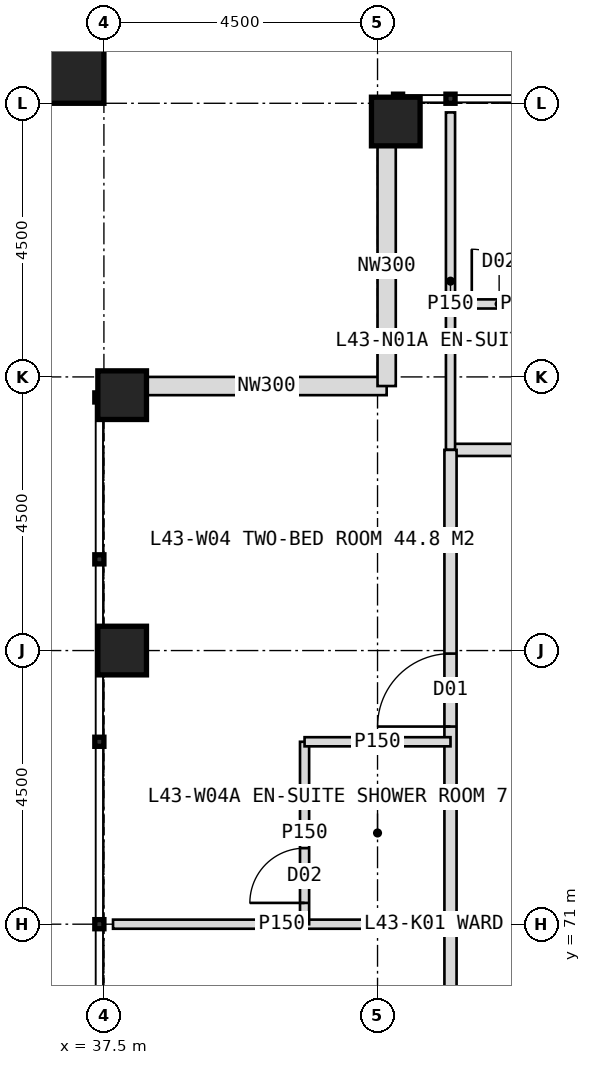
"""IFC4 building model, lengths in metres.
Left out: names, types, materials, properties, quantities, classifications, styles, units other than length and angle.
Written with IfcOpenShell. Run it as: python <this file> out.ifc"""

import sys

from ifc_helpers import new_model, si_unit, direction, frame, frame_2d, origin, origin_2d, place, context, subcontext, project, spatial, rectangle, hollow_rectangle, extrude, element, fill, save


model = new_model("IFC4")
c1 = context("Model", 3, precision=1e-05, world=origin(), true_north=direction((0.0, 1.0)))
c2 = subcontext(c1, "Body", "Model", "MODEL_VIEW")
j1 = project(units=[si_unit("LENGTHUNIT", "METRE"), si_unit("PLANEANGLEUNIT", "RADIAN")], contexts=[c1])
p1 = place(None, origin())
s1 = spatial("IfcSite", under=j1, at=p1, CompositionType="ELEMENT")
p2 = place(p1, origin())
s2 = spatial("IfcBuilding", under=s1, at=p2, CompositionType="ELEMENT")
p3 = place(p2, frame((0.0, 0.0, 181.0)))
s3 = spatial("IfcBuildingStorey", under=s2, at=p3, CompositionType="ELEMENT", Elevation=181.0)
for number, where, z_axis, x_axis in (
    (1, (42.3, 84.2, 0.0), (0.0, 0.0, 1.0), (1.0, 0.0, 0.0)),
    (2, (37.8, 75.5, 0.0), (0.0, 0.0, 1.0), (1.0, 0.0, 0.0)),
    (3, (37.8, 79.7, 0.0), (0.0, 0.0, 1.0), (1.0, 0.0, 0.0)),
):
    element("IfcColumn", number, at=place(p3, frame(where, z_axis=z_axis, x_axis=x_axis)), inside=s3, PredefinedType="COLUMN", context=c2, shape_type="SweptSolid", body=[
        extrude(hollow_rectangle(XDim=0.8, YDim=0.8, WallThickness=0.08, at=origin_2d()), origin(), (0.0, 0.0, 1.0), 4.0),
    ])
p4 = place(p3, frame((36.9, 85.1, 0.0), z_axis=(0.0, 0.0, 1.0), x_axis=(1.0, 0.0, 0.0)))
e4 = element("IfcColumn", 4, at=p4, inside=s3, PredefinedType="COLUMN", context=c2, shape_type="SweptSolid", body=[
    extrude(hollow_rectangle(XDim=1.2, YDim=1.2, WallThickness=0.07, at=origin_2d()), origin(), (0.0, 0.0, 1.0), 4.0),
])
for number, where, z_axis, x_axis in (
    (5, (38.2, 79.85, 0.0), (0.0, 0.0, 1.0), (1.0, 0.0, 0.0)),
    (6, (42.15, 79.85, 0.0), (0.0, 0.0, 1.0), (0.0, 1.0, 0.0)),
):
    element("IfcWall", number, at=place(p3, frame(where, z_axis=z_axis, x_axis=x_axis)), inside=s3, PredefinedType="ELEMENTEDWALL", context=c2, shape_type="SweptSolid", body=[
        extrude(rectangle(XDim=3.95, YDim=0.3, at=frame_2d((1.975, 0.0))), origin(), (0.0, 0.0, 1.0), 2.85),
    ])
p5 = place(p3, frame((43.2, 78.8, 0.0), z_axis=(0.0, 0.0, 1.0), x_axis=(1.0, 0.0, 0.0)))
e7 = element("IfcWall", 7, at=p5, inside=s3, PredefinedType="PARTITIONING", context=c2, shape_type="SweptSolid", body=[
    extrude(rectangle(XDim=33.6, YDim=0.2, at=frame_2d((16.8, 0.0))), origin(), (0.0, 0.0, 1.0), 3.75),
])
p6 = place(p5, frame((2.65, 0.0, 0.0)))
e8 = element("IfcOpeningElement", 8, at=p6, cuts=e7, PredefinedType="OPENING", context=c2, shape_type="SweptSolid", body=[
    extrude(rectangle(XDim=1.2, YDim=2.2, at=frame_2d((0.6, 1.1))), frame((0.0, 0.11, 0.0), z_axis=(0.0, -1.0, 0.0), x_axis=(1.0, 0.0, 0.0)), (0.0, 0.0, 1.0), 0.22),
])
p7 = place(p5, frame((14.05, 0.0, 0.0)))
e9 = element("IfcOpeningElement", 9, at=p7, cuts=e7, PredefinedType="OPENING", context=c2, shape_type="SweptSolid", body=[
    extrude(rectangle(XDim=1.2, YDim=2.2, at=frame_2d((0.6, 1.1))), frame((0.0, 0.11, 0.0), z_axis=(0.0, -1.0, 0.0), x_axis=(1.0, 0.0, 0.0)), (0.0, 0.0, 1.0), 0.22),
])
p8 = place(p5, frame((22.45, 0.0, 0.0)))
e10 = element("IfcOpeningElement", 10, at=p8, cuts=e7, PredefinedType="OPENING", context=c2, shape_type="SweptSolid", body=[
    extrude(rectangle(XDim=1.2, YDim=2.2, at=frame_2d((0.6, 1.1))), frame((0.0, 0.11, 0.0), z_axis=(0.0, -1.0, 0.0), x_axis=(1.0, 0.0, 0.0)), (0.0, 0.0, 1.0), 0.22),
])
p9 = place(p5, frame((29.2, 0.0, 0.0)))
e11 = element("IfcOpeningElement", 11, at=p9, cuts=e7, PredefinedType="OPENING", context=c2, shape_type="SweptSolid", body=[
    extrude(rectangle(XDim=1.0, YDim=2.1, at=frame_2d((0.5, 1.05))), frame((0.0, 0.11, 0.0), z_axis=(0.0, -1.0, 0.0), x_axis=(1.0, 0.0, 0.0)), (0.0, 0.0, 1.0), 0.22),
])
p10 = place(p3, frame((43.2, 78.8, 0.0), z_axis=(0.0, 0.0, 1.0), x_axis=(0.0, 1.0, 0.0)))
e12 = element("IfcWall", 12, at=p10, inside=s3, PredefinedType="PARTITIONING", context=c2, shape_type="SweptSolid", body=[
    extrude(rectangle(XDim=5.55, YDim=0.15, at=frame_2d((2.775, 0.0))), origin(), (0.0, 0.0, 1.0), 3.75),
])
p11 = place(p3, frame((43.2, 81.2, 0.0), z_axis=(0.0, 0.0, 1.0), x_axis=(1.0, 0.0, 0.0)))
e13 = element("IfcWall", 13, at=p11, inside=s3, PredefinedType="PARTITIONING", context=c2, shape_type="SweptSolid", body=[
    extrude(rectangle(XDim=2.4, YDim=0.15, at=frame_2d((1.2, 0.0))), origin(), (0.0, 0.0, 1.0), 3.75),
])
p12 = place(p11, frame((0.35, 0.0, 0.0)))
e14 = element("IfcOpeningElement", 14, at=p12, cuts=e13, PredefinedType="OPENING", context=c2, shape_type="SweptSolid", body=[
    extrude(rectangle(XDim=0.9, YDim=2.1, at=frame_2d((0.45, 1.05))), frame((0.0, 0.085, 0.0), z_axis=(0.0, -1.0, 0.0), x_axis=(1.0, 0.0, 0.0)), (0.0, 0.0, 1.0), 0.17),
])
p13 = place(p3, frame((43.2, 71.0, 0.0), z_axis=(0.0, 0.0, 1.0), x_axis=(-1.0, 0.0, 0.0)))
e15 = element("IfcWall", 15, at=p13, inside=s3, PredefinedType="PARTITIONING", context=c2, shape_type="SweptSolid", body=[
    extrude(rectangle(XDim=5.55, YDim=0.15, at=frame_2d((2.775, 0.0))), origin(), (0.0, 0.0, 1.0), 3.75),
])
p14 = place(p3, frame((43.2, 45.2, 0.0), z_axis=(0.0, 0.0, 1.0), x_axis=(0.0, 1.0, 0.0)))
e16 = element("IfcWall", 16, at=p14, inside=s3, PredefinedType="PARTITIONING", context=c2, shape_type="SweptSolid", body=[
    extrude(rectangle(XDim=33.6, YDim=0.2, at=frame_2d((16.8, 0.0))), origin(), (0.0, 0.0, 1.0), 3.75),
])
p15 = place(p14, frame((2.65, 0.0, 0.0)))
e17 = element("IfcOpeningElement", 17, at=p15, cuts=e16, PredefinedType="OPENING", context=c2, shape_type="SweptSolid", body=[
    extrude(rectangle(XDim=1.2, YDim=2.2, at=frame_2d((0.6, 1.1))), frame((0.0, 0.11, 0.0), z_axis=(0.0, -1.0, 0.0), x_axis=(1.0, 0.0, 0.0)), (0.0, 0.0, 1.0), 0.22),
])
p16 = place(p14, frame((13.45, 0.0, 0.0)))
e18 = element("IfcOpeningElement", 18, at=p16, cuts=e16, PredefinedType="OPENING", context=c2, shape_type="SweptSolid", body=[
    extrude(rectangle(XDim=1.2, YDim=2.2, at=frame_2d((0.6, 1.1))), frame((0.0, 0.11, 0.0), z_axis=(0.0, -1.0, 0.0), x_axis=(1.0, 0.0, 0.0)), (0.0, 0.0, 1.0), 0.22),
])
p17 = place(p14, frame((20.05, 0.0, 0.0)))
e19 = element("IfcOpeningElement", 19, at=p17, cuts=e16, PredefinedType="OPENING", context=c2, shape_type="SweptSolid", body=[
    extrude(rectangle(XDim=1.2, YDim=2.2, at=frame_2d((0.6, 1.1))), frame((0.0, 0.11, 0.0), z_axis=(0.0, -1.0, 0.0), x_axis=(1.0, 0.0, 0.0)), (0.0, 0.0, 1.0), 0.22),
])
p18 = place(p14, frame((29.05, 0.0, 0.0)))
e20 = element("IfcOpeningElement", 20, at=p18, cuts=e16, PredefinedType="OPENING", context=c2, shape_type="SweptSolid", body=[
    extrude(rectangle(XDim=1.2, YDim=2.2, at=frame_2d((0.6, 1.1))), frame((0.0, 0.11, 0.0), z_axis=(0.0, -1.0, 0.0), x_axis=(1.0, 0.0, 0.0)), (0.0, 0.0, 1.0), 0.22),
])
p19 = place(p3, frame((40.8, 71.0, 0.0), z_axis=(0.0, 0.0, 1.0), x_axis=(0.0, 1.0, 0.0)))
e21 = element("IfcWall", 21, at=p19, inside=s3, PredefinedType="PARTITIONING", context=c2, shape_type="SweptSolid", body=[
    extrude(rectangle(XDim=3.0, YDim=0.15, at=frame_2d((1.5, 0.0))), origin(), (0.0, 0.0, 1.0), 3.75),
])
p20 = place(p19, frame((0.35, 0.0, 0.0)))
e22 = element("IfcOpeningElement", 22, at=p20, cuts=e21, PredefinedType="OPENING", context=c2, shape_type="SweptSolid", body=[
    extrude(rectangle(XDim=0.9, YDim=2.1, at=frame_2d((0.45, 1.05))), frame((0.0, 0.085, 0.0), z_axis=(0.0, -1.0, 0.0), x_axis=(1.0, 0.0, 0.0)), (0.0, 0.0, 1.0), 0.17),
])
p21 = place(p3, frame((43.2, 74.0, 0.0), z_axis=(0.0, 0.0, 1.0), x_axis=(-1.0, 0.0, 0.0)))
e23 = element("IfcWall", 23, at=p21, inside=s3, PredefinedType="PARTITIONING", context=c2, shape_type="SweptSolid", body=[
    extrude(rectangle(XDim=2.4, YDim=0.15, at=frame_2d((1.2, 0.0))), origin(), (0.0, 0.0, 1.0), 3.75),
])
p22 = place(p12, origin())
e24 = element("IfcDoor", 24, at=p22, inside=s3, OperationType="SINGLE_SWING_LEFT", PredefinedType="DOOR", context=c2, shape_type="SweptSolid", body=[
    extrude(rectangle(XDim=0.9, YDim=2.1, at=frame_2d((0.45, 1.05))), frame((0.0, 0.025, 0.0), z_axis=(0.0, -1.0, 0.0), x_axis=(1.0, 0.0, 0.0)), (0.0, 0.0, 1.0), 0.05),
])
fill(e14, e24)
p23 = place(p18, origin())
e25 = element("IfcDoor", 25, at=p23, inside=s3, OperationType="SINGLE_SWING_LEFT", PredefinedType="DOOR", context=c2, shape_type="SweptSolid", body=[
    extrude(rectangle(XDim=1.2, YDim=2.2, at=frame_2d((0.6, 1.1))), frame((0.0, 0.025, 0.0), z_axis=(0.0, -1.0, 0.0), x_axis=(1.0, 0.0, 0.0)), (0.0, 0.0, 1.0), 0.05),
])
fill(e20, e25)
p24 = place(p20, origin())
e26 = element("IfcDoor", 26, at=p24, inside=s3, OperationType="SINGLE_SWING_LEFT", PredefinedType="DOOR", context=c2, shape_type="SweptSolid", body=[
    extrude(rectangle(XDim=0.9, YDim=2.1, at=frame_2d((0.45, 1.05))), frame((0.0, 0.025, 0.0), z_axis=(0.0, -1.0, 0.0), x_axis=(1.0, 0.0, 0.0)), (0.0, 0.0, 1.0), 0.05),
])
fill(e22, e26)
save(model, sys.argv[1])
